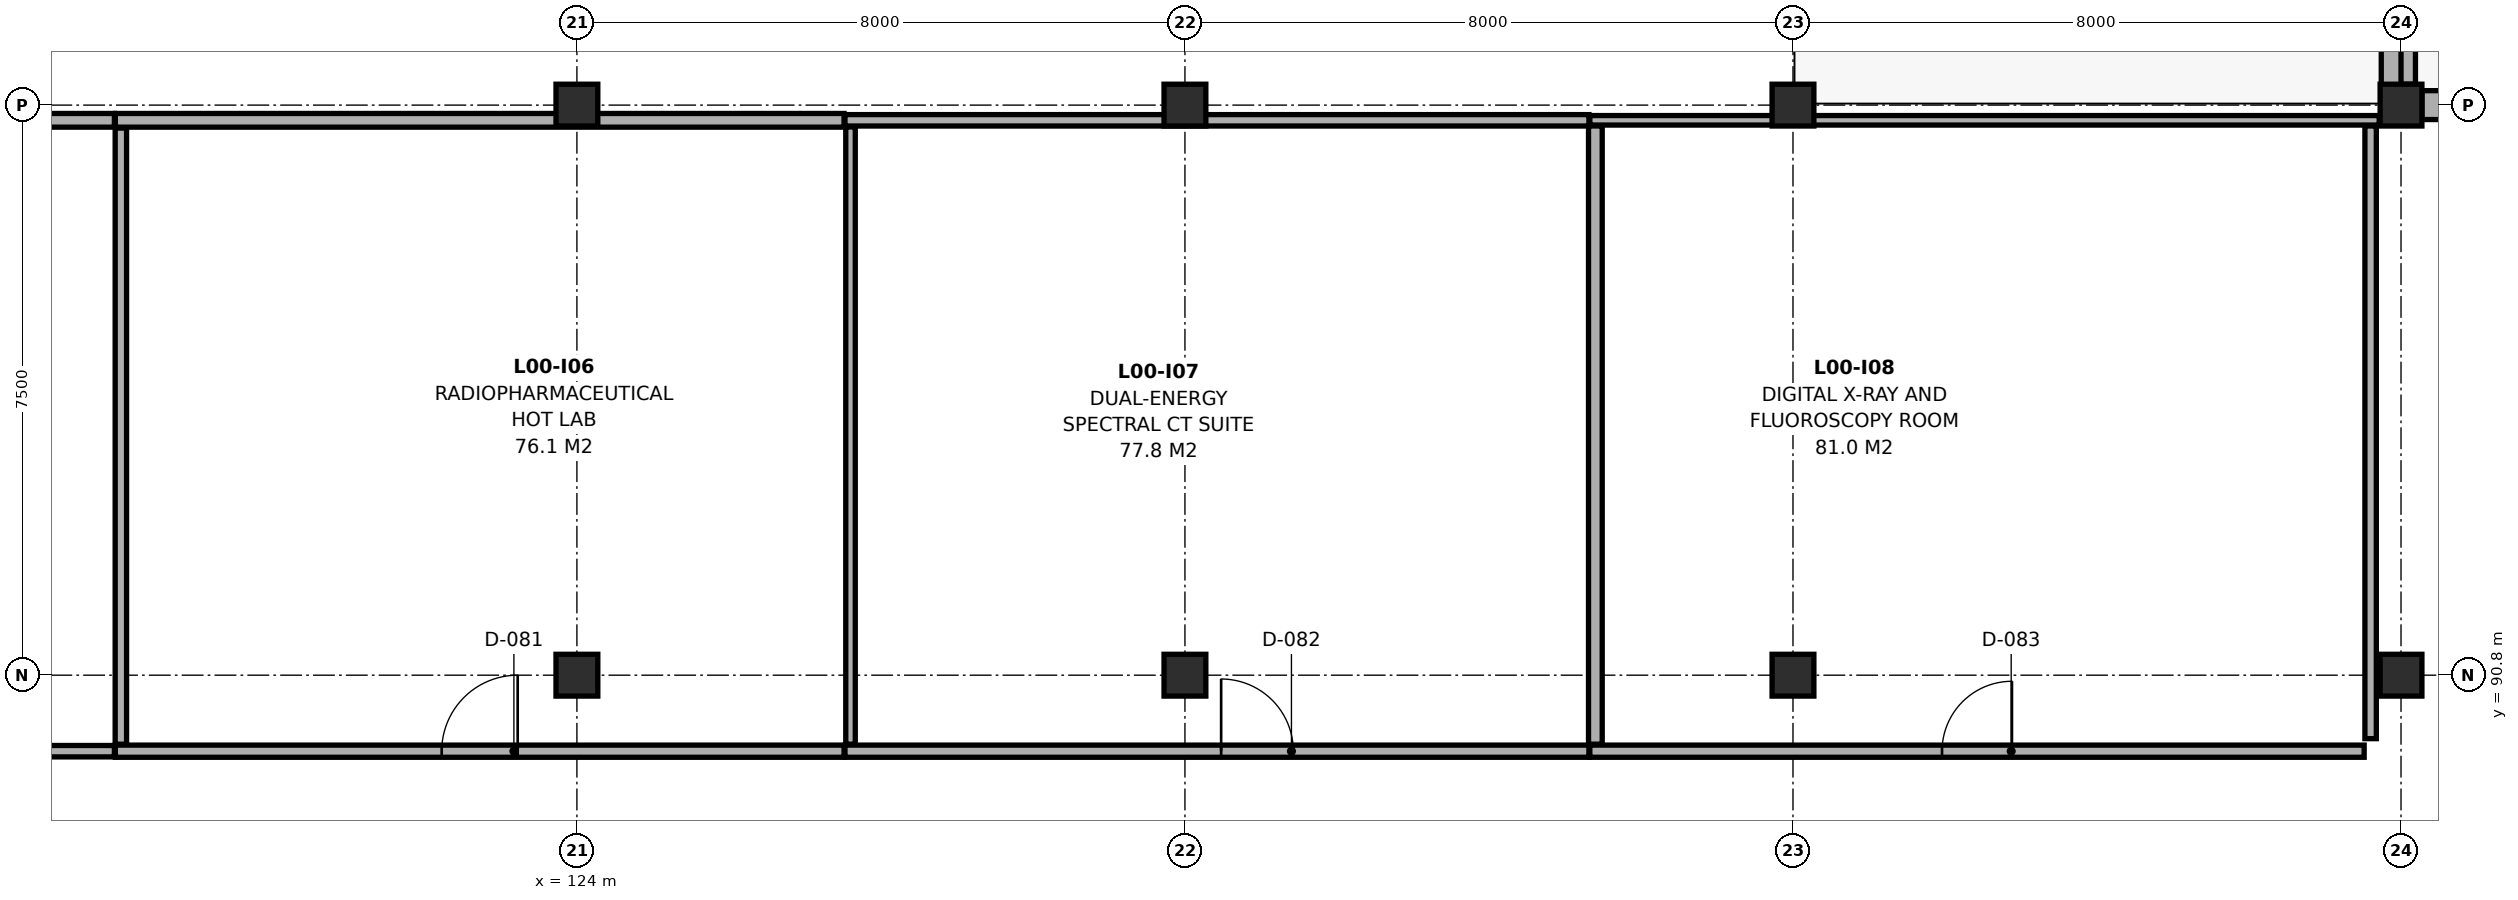
"""IFC4 building model, lengths in metres.
Left out: names, types, materials, properties, quantities, classifications, styles, units other than length and angle.
Written with IfcOpenShell. Run it as: python <this file> out.ifc"""

import sys

from ifc_helpers import new_model, si_unit, direction, frame, frame_2d, origin, origin_2d, place, context, subcontext, project, spatial, rectangle, extrude, element, fill, save


model = new_model("IFC4")
c1 = context("Model", 3, precision=1e-05, world=origin(), true_north=direction((0.0, 1.0)))
c2 = subcontext(c1, "Body", "Model", "MODEL_VIEW")
j1 = project(units=[si_unit("LENGTHUNIT", "METRE"), si_unit("PLANEANGLEUNIT", "RADIAN")], contexts=[c1])
p1 = place(None, origin())
s1 = spatial("IfcSite", under=j1, at=p1, CompositionType="ELEMENT")
p2 = place(p1, origin())
s2 = spatial("IfcBuilding", under=s1, at=p2, CompositionType="ELEMENT")
p3 = place(p2, origin())
s3 = spatial("IfcBuildingStorey", under=s2, at=p3, CompositionType="ELEMENT", Elevation=0.0)
for number, where, z_axis, x_axis in (
    (1, (124.0, 90.8, 0.0), (0.0, 0.0, 1.0), (1.0, 0.0, 0.0)),
    (2, (124.0, 98.3, 0.0), (0.0, 0.0, 1.0), (1.0, 0.0, 0.0)),
    (3, (132.0, 90.8, 0.0), (0.0, 0.0, 1.0), (1.0, 0.0, 0.0)),
    (4, (132.0, 98.3, 0.0), (0.0, 0.0, 1.0), (1.0, 0.0, 0.0)),
    (5, (140.0, 90.8, 0.0), (0.0, 0.0, 1.0), (1.0, 0.0, 0.0)),
    (6, (140.0, 98.3, 0.0), (0.0, 0.0, 1.0), (1.0, 0.0, 0.0)),
    (7, (148.0, 90.8, 0.0), (0.0, 0.0, 1.0), (1.0, 0.0, 0.0)),
    (8, (148.0, 98.3, 0.0), (0.0, 0.0, 1.0), (1.0, 0.0, 0.0)),
):
    element("IfcColumn", number, at=place(p3, frame(where, z_axis=z_axis, x_axis=x_axis)), inside=s3, PredefinedType="COLUMN", context=c2, shape_type="SweptSolid", body=[
        extrude(rectangle(XDim=0.55, YDim=0.55, at=origin_2d()), origin(), (0.0, 0.0, 1.0), 4.7),
    ])
p4 = place(p3, frame((148.0, 105.55, 0.0), z_axis=(0.0, 0.0, 1.0), x_axis=(0.0, -1.0, 0.0)))
e9 = element("IfcWall", 9, at=p4, inside=s3, PredefinedType="SOLIDWALL", context=c2, shape_type="SweptSolid", body=[
    extrude(rectangle(XDim=6.975, YDim=0.38, at=frame_2d((3.488, 0.0))), origin(), (0.0, 0.0, 1.0), 3.985),
])
p5 = place(p4, frame((0.587, 0.0, 0.0)))
e10 = element("IfcOpeningElement", 10, at=p5, cuts=e9, PredefinedType="OPENING", context=c2, shape_type="SweptSolid", body=[
    extrude(rectangle(XDim=5.8, YDim=3.0, at=frame_2d((2.9, 1.5))), frame((0.0, 0.202, 0.0), z_axis=(0.0, -1.0, 0.0), x_axis=(1.0, 0.0, 0.0)), (0.0, 0.0, 1.0), 0.404),
])
p6 = place(p3, frame((148.275, 98.3, 0.0), z_axis=(0.0, 0.0, 1.0), x_axis=(1.0, 0.0, 0.0)))
e11 = element("IfcWall", 11, at=p6, inside=s3, PredefinedType="SOLIDWALL", context=c2, shape_type="SweptSolid", body=[
    extrude(rectangle(XDim=7.45, YDim=0.38, at=frame_2d((3.725, 0.0))), origin(), (0.0, 0.0, 1.0), 3.985),
])
p7 = place(p6, frame((2.525, 0.0, 0.0)))
e12 = element("IfcOpeningElement", 12, at=p7, cuts=e11, PredefinedType="OPENING", context=c2, shape_type="SweptSolid", body=[
    extrude(rectangle(XDim=2.4, YDim=2.55, at=frame_2d((1.2, 1.275))), frame((0.0, 0.202, 0.0), z_axis=(0.0, -1.0, 0.0), x_axis=(1.0, 0.0, 0.0)), (0.0, 0.0, 1.0), 0.404),
])
p8 = place(p3, frame((147.87, 98.5, 4.9), z_axis=(0.0, 0.0, 1.0), x_axis=(0.0, 1.0, 0.0)))
e13 = element("IfcWall", 13, at=p8, inside=s3, PredefinedType="PARAPET", context=c2, shape_type="SweptSolid", body=[
    extrude(rectangle(XDim=7.3, YDim=0.26, at=frame_2d((3.65, 0.0))), origin(), (0.0, 0.0, 1.0), 1.15),
])
p9 = place(p3, frame((108.285, 89.8, 0.0), z_axis=(0.0, 0.0, 1.0), x_axis=(1.0, 0.0, 0.0)))
e14 = element("IfcWall", 14, at=p9, inside=s3, PredefinedType="PARTITIONING", context=c2, shape_type="SweptSolid", body=[
    extrude(rectangle(XDim=9.63, YDim=0.15, at=frame_2d((4.815, 0.0))), origin(), (0.0, 0.0, 1.0), 3.985),
])
p10 = place(p9, frame((4.215, 0.0, 0.0)))
e15 = element("IfcOpeningElement", 15, at=p10, cuts=e14, PredefinedType="OPENING", context=c2, shape_type="SweptSolid", body=[
    extrude(rectangle(XDim=1.2, YDim=2.15, at=frame_2d((0.6, 1.075))), frame((0.0, 0.087, 0.0), z_axis=(0.0, -1.0, 0.0), x_axis=(1.0, 0.0, 0.0)), (0.0, 0.0, 1.0), 0.174),
])
p11 = place(p3, frame((117.927, 89.8, 0.0), z_axis=(0.0, 0.0, 1.0), x_axis=(1.0, 0.0, 0.0)))
e16 = element("IfcWall", 16, at=p11, inside=s3, PredefinedType="PARTITIONING", context=c2, shape_type="SweptSolid", body=[
    extrude(rectangle(XDim=9.588, YDim=0.16, at=frame_2d((4.794, 0.0))), origin(), (0.0, 0.0, 1.0), 3.985),
])
p12 = place(p11, frame((4.294, 0.0, 0.0)))
e17 = element("IfcOpeningElement", 17, at=p12, cuts=e16, PredefinedType="OPENING", context=c2, shape_type="SweptSolid", body=[
    extrude(rectangle(XDim=1.0, YDim=2.22, at=frame_2d((0.5, 1.11))), frame((0.0, 0.092, 0.0), z_axis=(0.0, -1.0, 0.0), x_axis=(1.0, 0.0, 0.0)), (0.0, 0.0, 1.0), 0.184),
])
p13 = place(p3, frame((127.527, 89.8, 0.0), z_axis=(0.0, 0.0, 1.0), x_axis=(1.0, 0.0, 0.0)))
e18 = element("IfcWall", 18, at=p13, inside=s3, PredefinedType="PARTITIONING", context=c2, shape_type="SweptSolid", body=[
    extrude(rectangle(XDim=9.788, YDim=0.16, at=frame_2d((4.894, 0.0))), origin(), (0.0, 0.0, 1.0), 3.985),
])
p14 = place(p13, frame((4.949, 0.0, 0.0)))
e19 = element("IfcOpeningElement", 19, at=p14, cuts=e18, PredefinedType="OPENING", context=c2, shape_type="SweptSolid", body=[
    extrude(rectangle(XDim=0.95, YDim=2.15, at=frame_2d((0.475, 1.075))), frame((0.0, 0.092, 0.0), z_axis=(0.0, -1.0, 0.0), x_axis=(1.0, 0.0, 0.0)), (0.0, 0.0, 1.0), 0.184),
])
p15 = place(p3, frame((137.327, 89.8, 0.0), z_axis=(0.0, 0.0, 1.0), x_axis=(1.0, 0.0, 0.0)))
e20 = element("IfcWall", 20, at=p15, inside=s3, PredefinedType="PARTITIONING", context=c2, shape_type="SweptSolid", body=[
    extrude(rectangle(XDim=10.188, YDim=0.16, at=frame_2d((5.094, 0.0))), origin(), (0.0, 0.0, 1.0), 3.985),
])
p16 = place(p15, frame((4.634, 0.0, 0.0)))
e21 = element("IfcOpeningElement", 21, at=p16, cuts=e20, PredefinedType="OPENING", context=c2, shape_type="SweptSolid", body=[
    extrude(rectangle(XDim=0.92, YDim=2.1, at=frame_2d((0.46, 1.05))), frame((0.0, 0.092, 0.0), z_axis=(0.0, -1.0, 0.0), x_axis=(1.0, 0.0, 0.0)), (0.0, 0.0, 1.0), 0.184),
])
p17 = place(p3, frame((108.287, 98.1, 0.0), z_axis=(0.0, 0.0, 1.0), x_axis=(1.0, 0.0, 0.0)))
e22 = element("IfcWall", 22, at=p17, inside=s3, PredefinedType="PARTITIONING", context=c2, shape_type="SweptSolid", body=[
    extrude(rectangle(XDim=9.628, YDim=0.18, at=frame_2d((4.814, 0.0))), origin(), (0.0, 0.0, 1.0), 3.885),
])
p18 = place(p3, frame((117.927, 98.1, 0.0), z_axis=(0.0, 0.0, 1.0), x_axis=(1.0, 0.0, 0.0)))
e23 = element("IfcWall", 23, at=p18, inside=s3, PredefinedType="PARTITIONING", context=c2, shape_type="SweptSolid", body=[
    extrude(rectangle(XDim=9.588, YDim=0.18, at=frame_2d((4.794, 0.0))), origin(), (0.0, 0.0, 1.0), 3.885),
])
p19 = place(p3, frame((127.527, 98.1, 0.0), z_axis=(0.0, 0.0, 1.0), x_axis=(1.0, 0.0, 0.0)))
e24 = element("IfcWall", 24, at=p19, inside=s3, PredefinedType="PARTITIONING", context=c2, shape_type="SweptSolid", body=[
    extrude(rectangle(XDim=9.788, YDim=0.15, at=frame_2d((4.894, 0.0))), origin(), (0.0, 0.0, 1.0), 3.885),
])
p20 = place(p3, frame((137.327, 98.1, 0.0), z_axis=(0.0, 0.0, 1.0), x_axis=(1.0, 0.0, 0.0)))
e25 = element("IfcWall", 25, at=p20, inside=s3, PredefinedType="PARTITIONING", context=c2, shape_type="SweptSolid", body=[
    extrude(rectangle(XDim=10.386, YDim=0.125, at=frame_2d((5.193, 0.0))), origin(), (0.0, 0.0, 1.0), 3.885),
])
p21 = place(p3, frame((118.0, 89.892, 0.0), z_axis=(0.0, 0.0, 1.0), x_axis=(0.0, 1.0, 0.0)))
e26 = element("IfcWall", 26, at=p21, inside=s3, PredefinedType="PARTITIONING", context=c2, shape_type="SweptSolid", body=[
    extrude(rectangle(XDim=8.106, YDim=0.15, at=frame_2d((4.053, 0.0))), origin(), (0.0, 0.0, 1.0), 3.885),
])
p22 = place(p3, frame((127.6, 89.892, 0.0), z_axis=(0.0, 0.0, 1.0), x_axis=(0.0, 1.0, 0.0)))
e27 = element("IfcWall", 27, at=p22, inside=s3, PredefinedType="PARTITIONING", context=c2, shape_type="SweptSolid", body=[
    extrude(rectangle(XDim=8.121, YDim=0.125, at=frame_2d((4.061, 0.0))), origin(), (0.0, 0.0, 1.0), 3.885),
])
p23 = place(p3, frame((137.4, 89.892, 0.0), z_axis=(0.0, 0.0, 1.0), x_axis=(0.0, 1.0, 0.0)))
e28 = element("IfcWall", 28, at=p23, inside=s3, PredefinedType="PARTITIONING", context=c2, shape_type="SweptSolid", body=[
    extrude(rectangle(XDim=8.133, YDim=0.18, at=frame_2d((4.067, 0.0))), origin(), (0.0, 0.0, 1.0), 3.885),
])
p24 = place(p3, frame((147.6, 89.965, 0.0), z_axis=(0.0, 0.0, 1.0), x_axis=(0.0, 1.0, 0.0)))
e29 = element("IfcWall", 29, at=p24, inside=s3, PredefinedType="PARTITIONING", context=c2, shape_type="SweptSolid", body=[
    extrude(rectangle(XDim=8.06, YDim=0.15, at=frame_2d((4.03, 0.0))), origin(), (0.0, 0.0, 1.0), 3.885),
])
p25 = place(p12, origin())
e30 = element("IfcDoor", 30, at=p25, inside=s3, OperationType="SINGLE_SWING_RIGHT", PredefinedType="DOOR", context=c2, shape_type="SweptSolid", body=[
    extrude(rectangle(XDim=1.0, YDim=2.22, at=frame_2d((0.5, 1.11))), frame((0.0, 0.025, 0.0), z_axis=(0.0, -1.0, 0.0), x_axis=(1.0, 0.0, 0.0)), (0.0, 0.0, 1.0), 0.05),
])
fill(e17, e30)
p26 = place(p14, origin())
e31 = element("IfcDoor", 31, at=p26, inside=s3, OperationType="SINGLE_SWING_LEFT", PredefinedType="DOOR", context=c2, shape_type="SweptSolid", body=[
    extrude(rectangle(XDim=0.95, YDim=2.15, at=frame_2d((0.475, 1.075))), frame((0.0, 0.025, 0.0), z_axis=(0.0, -1.0, 0.0), x_axis=(1.0, 0.0, 0.0)), (0.0, 0.0, 1.0), 0.05),
])
fill(e19, e31)
p27 = place(p16, origin())
e32 = element("IfcDoor", 32, at=p27, inside=s3, OperationType="SINGLE_SWING_RIGHT", PredefinedType="DOOR", context=c2, shape_type="SweptSolid", body=[
    extrude(rectangle(XDim=0.92, YDim=2.1, at=frame_2d((0.46, 1.05))), frame((0.0, 0.025, 0.0), z_axis=(0.0, -1.0, 0.0), x_axis=(1.0, 0.0, 0.0)), (0.0, 0.0, 1.0), 0.05),
])
fill(e21, e32)
save(model, sys.argv[1])
